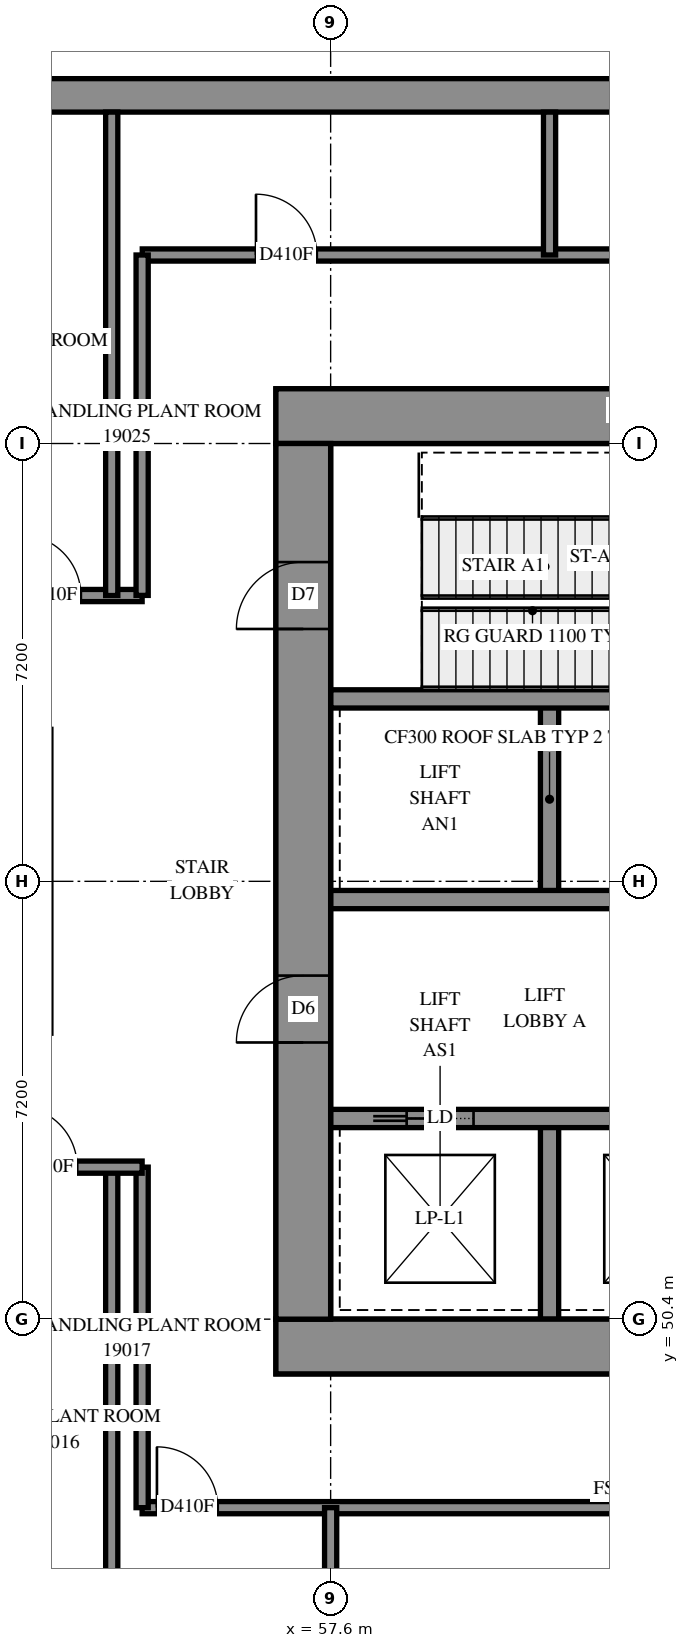
"""IFC4 building model, lengths in metres.
Left out: names, types, materials, properties, quantities, classifications, styles, units other than length and angle.
Written with IfcOpenShell. Run it as: python <this file> out.ifc"""

import sys

from ifc_helpers import new_model, si_unit, direction, frame, frame_2d, origin, place, context, subcontext, project, spatial, polyline, rectangle, outline, extrude, element, fill, save


model = new_model("IFC4")
c1 = context("Model", 3, precision=1e-05, world=origin(), true_north=direction((0.0, 1.0)))
c2 = subcontext(c1, "Body", "Model", "MODEL_VIEW")
j1 = project(units=[si_unit("LENGTHUNIT", "METRE"), si_unit("PLANEANGLEUNIT", "RADIAN")], contexts=[c1])
p1 = place(None, origin())
s1 = spatial("IfcSite", under=j1, at=p1, CompositionType="ELEMENT")
p2 = place(p1, origin())
s2 = spatial("IfcBuilding", under=s1, at=p2, CompositionType="ELEMENT")
p3 = place(p2, frame((0.0, 0.0, 72.0)))
s3 = spatial("IfcBuildingStorey", under=s2, at=p3, CompositionType="ELEMENT", Elevation=72.0)
p4 = place(p3, frame((56.7, 49.95, -0.3), z_axis=(0.0, 0.0, 1.0), x_axis=(1.0, 0.0, 0.0)))
e1 = element("IfcWall", 1, at=p4, inside=s3, PredefinedType="SHEAR", context=c2, shape_type="SweptSolid", body=[
    extrude(rectangle(XDim=16.2, YDim=0.9, at=frame_2d((8.1, 0.0))), origin(), (0.0, 0.0, 1.0), 4.3),
])
p5 = place(p3, frame((56.7, 65.25, -0.3), z_axis=(0.0, 0.0, 1.0), x_axis=(1.0, 0.0, 0.0)))
e2 = element("IfcWall", 2, at=p5, inside=s3, PredefinedType="SHEAR", context=c2, shape_type="SweptSolid", body=[
    extrude(rectangle(XDim=16.2, YDim=0.9, at=frame_2d((8.1, 0.0))), origin(), (0.0, 0.0, 1.0), 4.3),
])
p6 = place(p5, frame((10.9, 0.0, 0.3)))
e3 = element("IfcOpeningElement", 3, at=p6, cuts=e2, PredefinedType="OPENING", context=c2, shape_type="SweptSolid", body=[
    extrude(rectangle(XDim=0.8, YDim=2.1, at=frame_2d((0.4, 1.05))), frame((0.0, 0.46, 0.0), z_axis=(0.0, -1.0, 0.0), x_axis=(1.0, 0.0, 0.0)), (0.0, 0.0, 1.0), 0.92),
])
p7 = place(p3, frame((57.15, 50.4, -0.3), z_axis=(0.0, 0.0, 1.0), x_axis=(0.0, 1.0, 0.0)))
e4 = element("IfcWall", 4, at=p7, inside=s3, PredefinedType="SHEAR", context=c2, shape_type="SweptSolid", body=[
    extrude(rectangle(XDim=14.4, YDim=0.9, at=frame_2d((7.2, 0.0))), origin(), (0.0, 0.0, 1.0), 4.3),
])
p8 = place(p7, frame((4.55, 0.0, 0.3)))
e5 = element("IfcOpeningElement", 5, at=p8, cuts=e4, PredefinedType="OPENING", context=c2, shape_type="SweptSolid", body=[
    extrude(rectangle(XDim=1.1, YDim=2.1, at=frame_2d((0.55, 1.05))), frame((0.0, 0.46, 0.0), z_axis=(0.0, -1.0, 0.0), x_axis=(1.0, 0.0, 0.0)), (0.0, 0.0, 1.0), 0.92),
])
p9 = place(p7, frame((11.35, 0.0, 0.3)))
e6 = element("IfcOpeningElement", 6, at=p9, cuts=e4, PredefinedType="OPENING", context=c2, shape_type="SweptSolid", body=[
    extrude(rectangle(XDim=1.1, YDim=2.1, at=frame_2d((0.55, 1.05))), frame((0.0, 0.46, 0.0), z_axis=(0.0, -1.0, 0.0), x_axis=(1.0, 0.0, 0.0)), (0.0, 0.0, 1.0), 0.92),
])
for number, where, z_axis, x_axis in (
    (7, (61.2, 50.4, 0.0), (0.0, 0.0, 1.0), (0.0, 1.0, 0.0)),
    (8, (61.2, 57.3, 0.0), (0.0, 0.0, 1.0), (0.0, 1.0, 0.0)),
):
    element("IfcWall", number, at=place(p3, frame(where, z_axis=z_axis, x_axis=x_axis)), inside=s3, PredefinedType="SOLIDWALL", context=c2, shape_type="SweptSolid", body=[
        extrude(rectangle(XDim=3.3, YDim=0.3, at=frame_2d((1.65, 0.0))), origin(), (0.0, 0.0, 1.0), 4.7),
    ])
p10 = place(p3, frame((57.6, 53.7, 0.0), z_axis=(0.0, 0.0, 1.0), x_axis=(1.0, 0.0, 0.0)))
e9 = element("IfcWall", 9, at=p10, inside=s3, PredefinedType="SOLIDWALL", context=c2, shape_type="SweptSolid", body=[
    extrude(rectangle(XDim=14.4, YDim=0.3, at=frame_2d((7.2, 0.0))), origin(), (0.0, 0.0, 1.0), 4.7),
])
p11 = place(p10, frame((1.25, 0.0, 0.0)))
e10 = element("IfcOpeningElement", 10, at=p11, cuts=e9, PredefinedType="OPENING", context=c2, shape_type="SweptSolid", body=[
    extrude(rectangle(XDim=1.1, YDim=2.1, at=frame_2d((0.55, 1.05))), frame((0.0, 0.16, 0.0), z_axis=(0.0, -1.0, 0.0), x_axis=(1.0, 0.0, 0.0)), (0.0, 0.0, 1.0), 0.32),
])
p12 = place(p10, frame((4.85, 0.0, 0.0)))
e11 = element("IfcOpeningElement", 11, at=p12, cuts=e9, PredefinedType="OPENING", context=c2, shape_type="SweptSolid", body=[
    extrude(rectangle(XDim=1.1, YDim=2.1, at=frame_2d((0.55, 1.05))), frame((0.0, 0.16, 0.0), z_axis=(0.0, -1.0, 0.0), x_axis=(1.0, 0.0, 0.0)), (0.0, 0.0, 1.0), 0.32),
])
p13 = place(p10, frame((8.45, 0.0, 0.0)))
e12 = element("IfcOpeningElement", 12, at=p13, cuts=e9, PredefinedType="OPENING", context=c2, shape_type="SweptSolid", body=[
    extrude(rectangle(XDim=1.1, YDim=2.1, at=frame_2d((0.55, 1.05))), frame((0.0, 0.16, 0.0), z_axis=(0.0, -1.0, 0.0), x_axis=(1.0, 0.0, 0.0)), (0.0, 0.0, 1.0), 0.32),
])
p14 = place(p10, frame((12.05, 0.0, 0.0)))
e13 = element("IfcOpeningElement", 13, at=p14, cuts=e9, PredefinedType="OPENING", context=c2, shape_type="SweptSolid", body=[
    extrude(rectangle(XDim=1.1, YDim=2.1, at=frame_2d((0.55, 1.05))), frame((0.0, 0.16, 0.0), z_axis=(0.0, -1.0, 0.0), x_axis=(1.0, 0.0, 0.0)), (0.0, 0.0, 1.0), 0.32),
])
p15 = place(p3, frame((57.6, 57.3, 0.0), z_axis=(0.0, 0.0, 1.0), x_axis=(1.0, 0.0, 0.0)))
e14 = element("IfcWall", 14, at=p15, inside=s3, PredefinedType="SOLIDWALL", context=c2, shape_type="SweptSolid", body=[
    extrude(rectangle(XDim=14.4, YDim=0.3, at=frame_2d((7.2, 0.0))), origin(), (0.0, 0.0, 1.0), 4.7),
])
p16 = place(p15, frame((12.05, 0.0, 0.0)))
e15 = element("IfcOpeningElement", 15, at=p16, cuts=e14, PredefinedType="OPENING", context=c2, shape_type="SweptSolid", body=[
    extrude(rectangle(XDim=1.1, YDim=2.1, at=frame_2d((0.55, 1.05))), frame((0.0, 0.16, 0.0), z_axis=(0.0, -1.0, 0.0), x_axis=(1.0, 0.0, 0.0)), (0.0, 0.0, 1.0), 0.32),
])
p17 = place(p3, frame((57.6, 60.6, 0.0), z_axis=(0.0, 0.0, 1.0), x_axis=(1.0, 0.0, 0.0)))
e16 = element("IfcWall", 16, at=p17, inside=s3, PredefinedType="SOLIDWALL", context=c2, shape_type="SweptSolid", body=[
    extrude(rectangle(XDim=7.2, YDim=0.3, at=frame_2d((3.6, 0.0))), origin(), (0.0, 0.0, 1.0), 4.7),
])
p18 = place(p3, frame((78.589, 70.525, 0.0), z_axis=(0.0, 0.0, 1.0), x_axis=(-1.0, 0.0, 0.0)))
e17 = element("IfcWall", 17, at=p18, inside=s3, PredefinedType="SOLIDWALL", context=c2, shape_type="SweptSolid", body=[
    extrude(outline(polyline([(-0.114, -0.275), (55.789, -0.275), (55.239, 0.275), (0.114, 0.275), (-0.114, -0.275)])), origin(), (0.0, 0.0, 1.0), 4.7),
])
p19 = place(p3, frame((33.502, 62.3, 0.0), z_axis=(0.0, 0.0, 1.0), x_axis=(1.0, 0.0, 0.0)))
e18 = element("IfcWall", 18, at=p19, inside=s3, PredefinedType="PARTITIONING", context=c2, shape_type="SweptSolid", body=[
    extrude(rectangle(XDim=20.998, YDim=0.2, at=frame_2d((10.499, 0.0))), origin(), (0.0, 0.0, 1.0), 4.7),
])
p20 = place(p19, frame((6.361, 0.0, 0.0)))
e19 = element("IfcOpeningElement", 19, at=p20, cuts=e18, PredefinedType="OPENING", context=c2, shape_type="SweptSolid", body=[
    extrude(rectangle(XDim=1.0, YDim=2.1, at=frame_2d((0.5, 1.05))), frame((0.0, 0.11, 0.0), z_axis=(0.0, -1.0, 0.0), x_axis=(1.0, 0.0, 0.0)), (0.0, 0.0, 1.0), 0.22),
])
p21 = place(p19, frame((13.56, 0.0, 0.0)))
e20 = element("IfcOpeningElement", 20, at=p21, cuts=e18, PredefinedType="OPENING", context=c2, shape_type="SweptSolid", body=[
    extrude(rectangle(XDim=1.0, YDim=2.1, at=frame_2d((0.5, 1.05))), frame((0.0, 0.11, 0.0), z_axis=(0.0, -1.0, 0.0), x_axis=(1.0, 0.0, 0.0)), (0.0, 0.0, 1.0), 0.22),
])
p22 = place(p19, frame((18.991, 0.0, 0.0)))
e21 = element("IfcOpeningElement", 21, at=p22, cuts=e18, PredefinedType="OPENING", context=c2, shape_type="SweptSolid", body=[
    extrude(rectangle(XDim=1.0, YDim=2.1, at=frame_2d((0.5, 1.05))), frame((0.0, 0.11, 0.0), z_axis=(0.0, -1.0, 0.0), x_axis=(1.0, 0.0, 0.0)), (0.0, 0.0, 1.0), 0.22),
])
p23 = place(p3, frame((54.502, 67.9, 0.0), z_axis=(0.0, 0.0, 1.0), x_axis=(1.0, 0.0, 0.0)))
e22 = element("IfcWall", 22, at=p23, inside=s3, PredefinedType="PARTITIONING", context=c2, shape_type="SweptSolid", body=[
    extrude(rectangle(XDim=20.598, YDim=0.2, at=frame_2d((10.299, 0.0))), origin(), (0.0, 0.0, 1.0), 4.7),
])
p24 = place(p23, frame((1.871, 0.0, 0.0)))
e23 = element("IfcOpeningElement", 23, at=p24, cuts=e22, PredefinedType="OPENING", context=c2, shape_type="SweptSolid", body=[
    extrude(rectangle(XDim=1.0, YDim=2.1, at=frame_2d((0.5, 1.05))), frame((0.0, 0.11, 0.0), z_axis=(0.0, -1.0, 0.0), x_axis=(1.0, 0.0, 0.0)), (0.0, 0.0, 1.0), 0.22),
])
p25 = place(p23, frame((16.273, 0.0, 0.0)))
e24 = element("IfcOpeningElement", 24, at=p25, cuts=e22, PredefinedType="OPENING", context=c2, shape_type="SweptSolid", body=[
    extrude(rectangle(XDim=1.0, YDim=2.1, at=frame_2d((0.5, 1.05))), frame((0.0, 0.11, 0.0), z_axis=(0.0, -1.0, 0.0), x_axis=(1.0, 0.0, 0.0)), (0.0, 0.0, 1.0), 0.22),
])
p26 = place(p23, frame((9.036, 0.0, 0.0)))
e25 = element("IfcOpeningElement", 25, at=p26, cuts=e22, PredefinedType="OPENING", context=c2, shape_type="SweptSolid", body=[
    extrude(rectangle(XDim=1.0, YDim=2.1, at=frame_2d((0.5, 1.05))), frame((0.0, 0.11, 0.0), z_axis=(0.0, -1.0, 0.0), x_axis=(1.0, 0.0, 0.0)), (0.0, 0.0, 1.0), 0.22),
])
p27 = place(p3, frame((54.5, 47.3, 0.0), z_axis=(0.0, 0.0, 1.0), x_axis=(1.0, 0.0, 0.0)))
e26 = element("IfcWall", 26, at=p27, inside=s3, PredefinedType="PARTITIONING", context=c2, shape_type="SweptSolid", body=[
    extrude(rectangle(XDim=19.56, YDim=0.2, at=frame_2d((9.78, 0.0))), origin(), (0.0, 0.0, 1.0), 4.7),
])
p28 = place(p27, frame((0.243, 0.0, 0.0)))
e27 = element("IfcOpeningElement", 27, at=p28, cuts=e26, PredefinedType="OPENING", context=c2, shape_type="SweptSolid", body=[
    extrude(rectangle(XDim=1.0, YDim=2.1, at=frame_2d((0.5, 1.05))), frame((0.0, 0.11, 0.0), z_axis=(0.0, -1.0, 0.0), x_axis=(1.0, 0.0, 0.0)), (0.0, 0.0, 1.0), 0.22),
])
p29 = place(p27, frame((12.457, 0.0, 0.0)))
e28 = element("IfcOpeningElement", 28, at=p29, cuts=e26, PredefinedType="OPENING", context=c2, shape_type="SweptSolid", body=[
    extrude(rectangle(XDim=1.0, YDim=2.1, at=frame_2d((0.5, 1.05))), frame((0.0, 0.11, 0.0), z_axis=(0.0, -1.0, 0.0), x_axis=(1.0, 0.0, 0.0)), (0.0, 0.0, 1.0), 0.22),
])
for number, where, z_axis, x_axis in (
    (29, (54.0, 44.95, 0.0), (0.0, 0.0, 1.0), (0.0, 1.0, 0.0)),
    (30, (54.0, 62.3, 0.0), (0.0, 0.0, 1.0), (0.0, 1.0, 0.0)),
):
    element("IfcWall", number, at=place(p3, frame(where, z_axis=z_axis, x_axis=x_axis)), inside=s3, PredefinedType="PARTITIONING", context=c2, shape_type="SweptSolid", body=[
        extrude(rectangle(XDim=7.95, YDim=0.2, at=frame_2d((3.975, 0.0))), origin(), (0.0, 0.0, 1.0), 4.7),
    ])
p30 = place(p3, frame((54.5, 47.3, 0.0), z_axis=(0.0, 0.0, 1.0), x_axis=(0.0, 1.0, 0.0)))
e31 = element("IfcWall", 31, at=p30, inside=s3, PredefinedType="PARTITIONING", context=c2, shape_type="SweptSolid", body=[
    extrude(rectangle(XDim=5.6, YDim=0.2, at=frame_2d((2.8, 0.0))), origin(), (0.0, 0.0, 1.0), 4.7),
])
p31 = place(p3, frame((54.5, 62.302, 0.0), z_axis=(0.0, 0.0, 1.0), x_axis=(0.0, 1.0, 0.0)))
e32 = element("IfcWall", 32, at=p31, inside=s3, PredefinedType="PARTITIONING", context=c2, shape_type="SweptSolid", body=[
    extrude(rectangle(XDim=5.598, YDim=0.2, at=frame_2d((2.799, 0.0))), origin(), (0.0, 0.0, 1.0), 4.7),
])
p32 = place(p3, frame((50.4, 52.9, 0.0), z_axis=(0.0, 0.0, 1.0), x_axis=(1.0, 0.0, 0.0)))
e33 = element("IfcWall", 33, at=p32, inside=s3, PredefinedType="PARTITIONING", context=c2, shape_type="SweptSolid", body=[
    extrude(rectangle(XDim=4.1, YDim=0.2, at=frame_2d((2.05, 0.0))), origin(), (0.0, 0.0, 1.0), 4.7),
])
p33 = place(p32, frame((2.033, 0.0, 0.0)))
e34 = element("IfcOpeningElement", 34, at=p33, cuts=e33, PredefinedType="OPENING", context=c2, shape_type="SweptSolid", body=[
    extrude(rectangle(XDim=1.0, YDim=2.1, at=frame_2d((0.5, 1.05))), frame((0.0, 0.11, 0.0), z_axis=(0.0, -1.0, 0.0), x_axis=(1.0, 0.0, 0.0)), (0.0, 0.0, 1.0), 0.22),
])
for number, where, z_axis, x_axis in (
    (35, (57.6, 44.95, 0.0), (0.0, 0.0, 1.0), (0.0, 1.0, 0.0)),
    (36, (61.2, 67.9, 0.0), (0.0, 0.0, 1.0), (0.0, 1.0, 0.0)),
):
    element("IfcWall", number, at=place(p3, frame(where, z_axis=z_axis, x_axis=x_axis)), inside=s3, PredefinedType="PARTITIONING", context=c2, shape_type="SweptSolid", body=[
        extrude(rectangle(XDim=2.35, YDim=0.2, at=frame_2d((1.175, 0.0))), origin(), (0.0, 0.0, 1.0), 4.7),
    ])
p34 = place(p8, origin())
e37 = element("IfcDoor", 37, at=p34, inside=s3, OperationType="DOUBLE_DOOR_SINGLE_SWING", PredefinedType="DOOR", context=c2, shape_type="SweptSolid", body=[
    extrude(rectangle(XDim=1.1, YDim=2.1, at=frame_2d((0.55, 1.05))), frame((0.0, 0.025, 0.0), z_axis=(0.0, -1.0, 0.0), x_axis=(1.0, 0.0, 0.0)), (0.0, 0.0, 1.0), 0.05),
])
fill(e5, e37)
p35 = place(p9, origin())
e38 = element("IfcDoor", 38, at=p35, inside=s3, OperationType="SINGLE_SWING_LEFT", PredefinedType="DOOR", context=c2, shape_type="SweptSolid", body=[
    extrude(rectangle(XDim=1.1, YDim=2.1, at=frame_2d((0.55, 1.05))), frame((0.0, 0.025, 0.0), z_axis=(0.0, -1.0, 0.0), x_axis=(1.0, 0.0, 0.0)), (0.0, 0.0, 1.0), 0.05),
])
fill(e6, e38)
p36 = place(p11, origin())
e39 = element("IfcDoor", 39, at=p36, inside=s3, OperationType="SLIDING_TO_LEFT", PredefinedType="DOOR", context=c2, shape_type="SweptSolid", body=[
    extrude(rectangle(XDim=1.1, YDim=2.1, at=frame_2d((0.55, 1.05))), frame((0.0, 0.025, 0.0), z_axis=(0.0, -1.0, 0.0), x_axis=(1.0, 0.0, 0.0)), (0.0, 0.0, 1.0), 0.05),
])
fill(e10, e39)
p37 = place(p33, origin())
e40 = element("IfcDoor", 40, at=p37, inside=s3, OperationType="SINGLE_SWING_LEFT", PredefinedType="DOOR", context=c2, shape_type="SweptSolid", body=[
    extrude(rectangle(XDim=1.0, YDim=2.1, at=frame_2d((0.5, 1.05))), frame((0.0, 0.025, 0.0), z_axis=(0.0, -1.0, 0.0), x_axis=(1.0, 0.0, 0.0)), (0.0, 0.0, 1.0), 0.05),
])
fill(e34, e40)
p38 = place(p28, origin())
e41 = element("IfcDoor", 41, at=p38, inside=s3, OperationType="SINGLE_SWING_RIGHT", PredefinedType="DOOR", context=c2, shape_type="SweptSolid", body=[
    extrude(rectangle(XDim=1.0, YDim=2.1, at=frame_2d((0.5, 1.05))), frame((0.0, 0.025, 0.0), z_axis=(0.0, -1.0, 0.0), x_axis=(1.0, 0.0, 0.0)), (0.0, 0.0, 1.0), 0.05),
])
fill(e27, e41)
p39 = place(p22, origin())
e42 = element("IfcDoor", 42, at=p39, inside=s3, OperationType="SINGLE_SWING_RIGHT", PredefinedType="DOOR", context=c2, shape_type="SweptSolid", body=[
    extrude(rectangle(XDim=1.0, YDim=2.1, at=frame_2d((0.5, 1.05))), frame((0.0, 0.025, 0.0), z_axis=(0.0, -1.0, 0.0), x_axis=(1.0, 0.0, 0.0)), (0.0, 0.0, 1.0), 0.05),
])
fill(e21, e42)
p40 = place(p24, origin())
e43 = element("IfcDoor", 43, at=p40, inside=s3, OperationType="SINGLE_SWING_LEFT", PredefinedType="DOOR", context=c2, shape_type="SweptSolid", body=[
    extrude(rectangle(XDim=1.0, YDim=2.1, at=frame_2d((0.5, 1.05))), frame((0.0, 0.025, 0.0), z_axis=(0.0, -1.0, 0.0), x_axis=(1.0, 0.0, 0.0)), (0.0, 0.0, 1.0), 0.05),
])
fill(e23, e43)
save(model, sys.argv[1])
